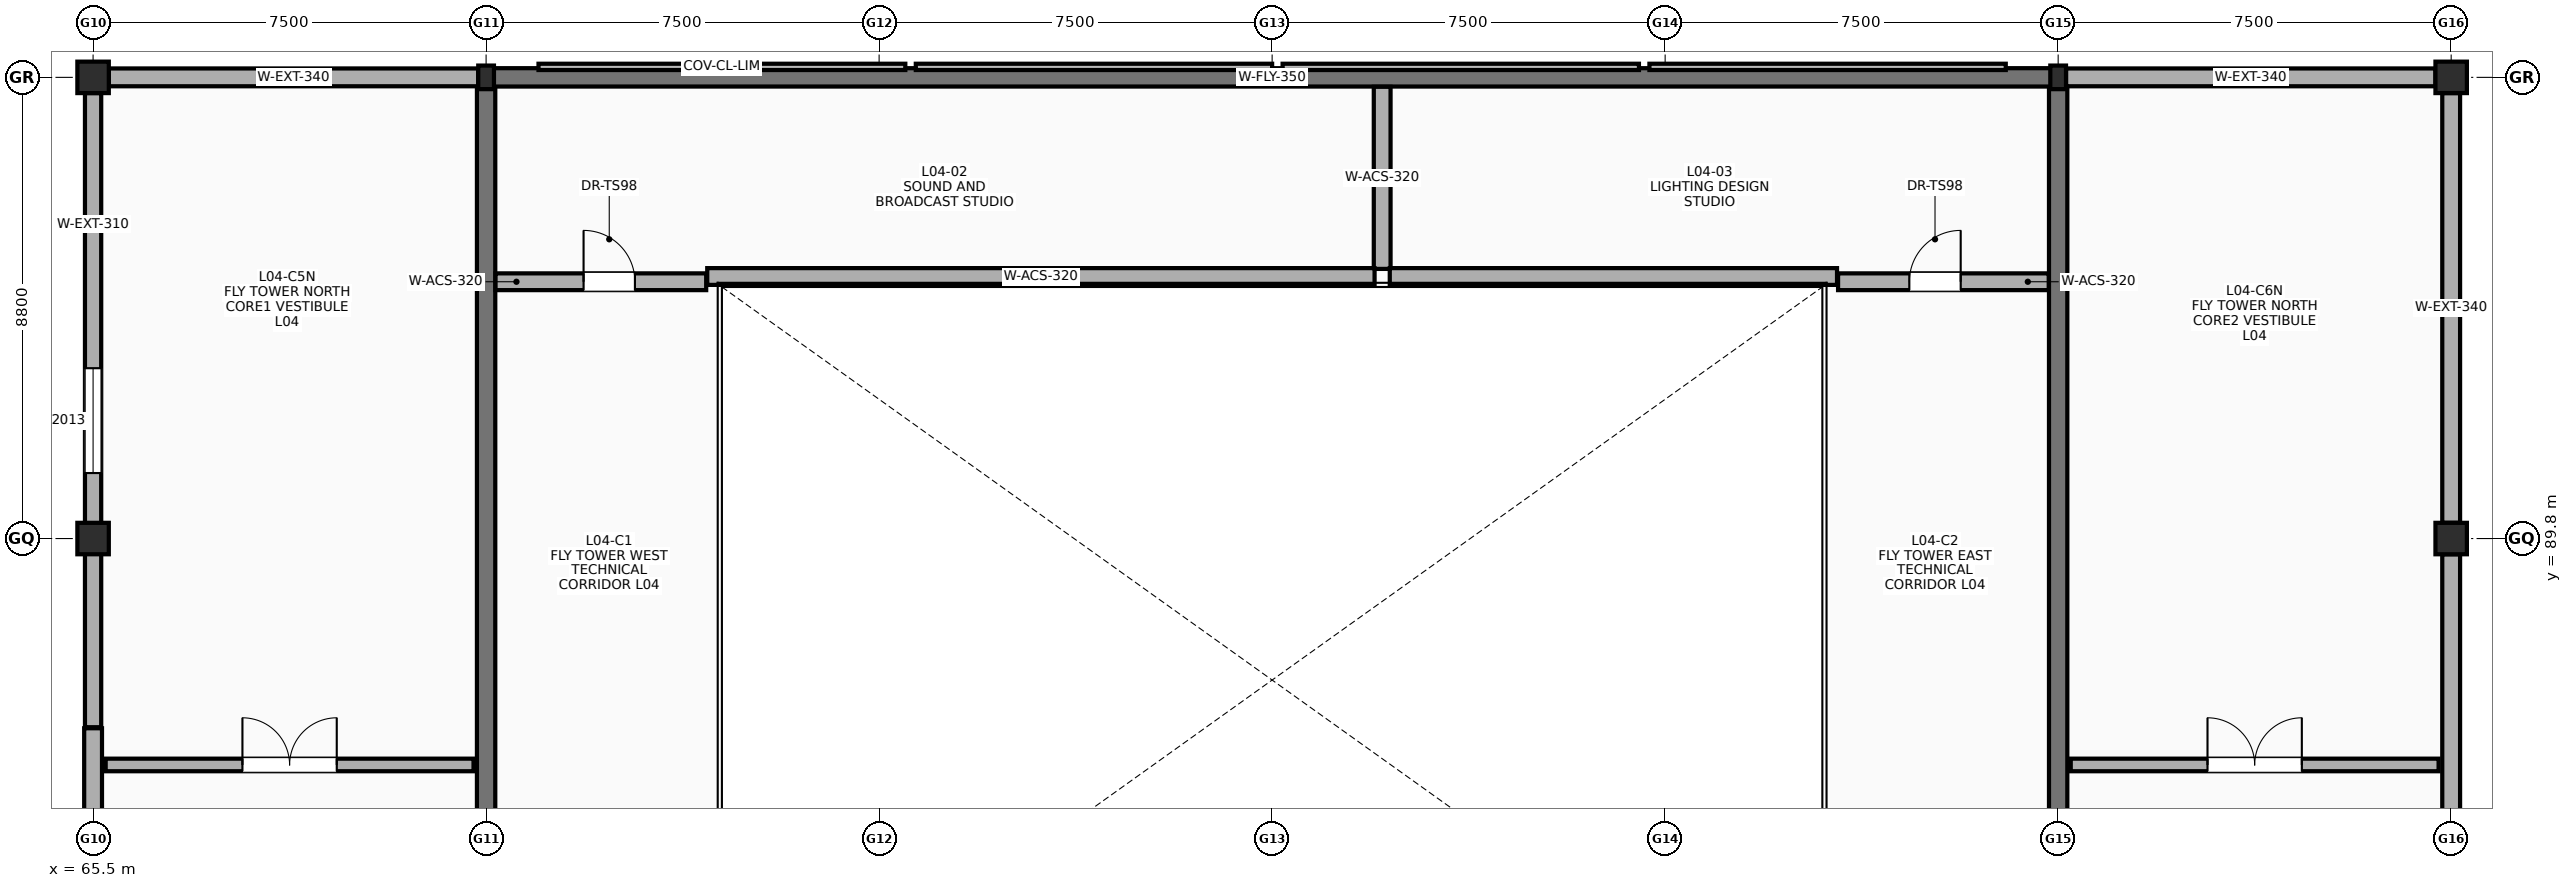
"""IFC4 building model, lengths in metres.
Left out: names, types, materials, properties, quantities, classifications, styles, units other than length and angle.
Written with IfcOpenShell. Run it as: python <this file> out.ifc"""

import sys

from ifc_helpers import new_model, si_unit, direction, frame, frame_2d, origin, origin_2d, place, context, subcontext, project, spatial, rectangle, i_section, extrude, element, fill, save


model = new_model("IFC4")
c1 = context("Model", 3, precision=1e-05, world=origin(), true_north=direction((0.0, 1.0)))
c2 = subcontext(c1, "Body", "Model", "MODEL_VIEW")
j1 = project(units=[si_unit("LENGTHUNIT", "METRE"), si_unit("PLANEANGLEUNIT", "RADIAN")], contexts=[c1])
p1 = place(None, origin())
s1 = spatial("IfcSite", under=j1, at=p1, CompositionType="ELEMENT")
p2 = place(p1, origin())
s2 = spatial("IfcBuilding", under=s1, at=p2, CompositionType="ELEMENT")
p3 = place(p2, frame((0.0, 0.0, 18.0)))
s3 = spatial("IfcBuildingStorey", under=s2, at=p3, CompositionType="ELEMENT", Elevation=18.0)
for number, where, z_axis, x_axis in (
    (1, (65.5, 89.8, 0.0), (0.0, 0.0, 1.0), (1.0, 0.0, 0.0)),
    (2, (65.5, 98.6, 0.0), (0.0, 0.0, 1.0), (1.0, 0.0, 0.0)),
):
    element("IfcColumn", number, at=place(p3, frame(where, z_axis=z_axis, x_axis=x_axis)), inside=s3, PredefinedType="COLUMN", context=c2, shape_type="SweptSolid", body=[
        extrude(rectangle(XDim=0.6, YDim=0.6, at=origin_2d()), origin(), (0.0, 0.0, 1.0), 5.4),
    ])
for number, where, z_axis, x_axis in (
    (3, (73.0, 98.6, 0.0), (0.0, 0.0, 1.0), (1.0, 0.0, 0.0)),
    (4, (103.0, 98.6, 0.0), (0.0, 0.0, 1.0), (1.0, 0.0, 0.0)),
):
    element("IfcColumn", number, at=place(p3, frame(where, z_axis=z_axis, x_axis=x_axis)), inside=s3, PredefinedType="COLUMN", context=c2, shape_type="SweptSolid", body=[
        extrude(i_section(OverallWidth=0.3, OverallDepth=0.45, WebThickness=0.014, FlangeThickness=0.026, FilletRadius=0.027, at=origin_2d()), origin(), (0.0, 0.0, 1.0), 5.4),
    ])
for number, where, z_axis, x_axis in (
    (5, (110.5, 89.8, 0.0), (0.0, 0.0, 1.0), (1.0, 0.0, 0.0)),
    (6, (110.5, 98.6, 0.0), (0.0, 0.0, 1.0), (1.0, 0.0, 0.0)),
):
    element("IfcColumn", number, at=place(p3, frame(where, z_axis=z_axis, x_axis=x_axis)), inside=s3, PredefinedType="COLUMN", context=c2, shape_type="SweptSolid", body=[
        extrude(rectangle(XDim=0.6, YDim=0.6, at=origin_2d()), origin(), (0.0, 0.0, 1.0), 5.4),
    ])
p4 = place(p3, frame((73.0, 72.815, 0.0), z_axis=(0.0, 0.0, 1.0), x_axis=(0.0, 1.0, 0.0)))
e7 = element("IfcWall", 7, at=p4, inside=s3, PredefinedType="SHEAR", context=c2, shape_type="SweptSolid", body=[
    extrude(rectangle(XDim=25.57, YDim=0.35, at=frame_2d((12.785, 0.0))), origin(), (0.0, 0.0, 1.0), 5.4),
])
p5 = place(p4, frame((11.285, 0.0, 0.0), z_axis=(0.0, 0.0, 1.0), x_axis=(-1.0, 0.0, 0.0)))
e8 = element("IfcOpeningElement", 8, at=p5, cuts=e7, PredefinedType="OPENING", context=c2, shape_type="SweptSolid", body=[
    extrude(rectangle(XDim=1.2, YDim=2.15, at=frame_2d((0.6, 1.075))), frame((0.0, 0.185, 0.0), z_axis=(0.0, -1.0, 0.0), x_axis=(1.0, 0.0, 0.0)), (0.0, 0.0, 1.0), 0.37),
])
p6 = place(p3, frame((103.0, 72.815, 0.0), z_axis=(0.0, 0.0, 1.0), x_axis=(0.0, 1.0, 0.0)))
e9 = element("IfcWall", 9, at=p6, inside=s3, PredefinedType="SHEAR", context=c2, shape_type="SweptSolid", body=[
    extrude(rectangle(XDim=25.57, YDim=0.35, at=frame_2d((12.785, 0.0))), origin(), (0.0, 0.0, 1.0), 5.4),
])
p7 = place(p6, frame((10.085, 0.0, 0.0)))
e10 = element("IfcOpeningElement", 10, at=p7, cuts=e9, PredefinedType="OPENING", context=c2, shape_type="SweptSolid", body=[
    extrude(rectangle(XDim=1.2, YDim=2.15, at=frame_2d((0.6, 1.075))), frame((0.0, 0.185, 0.0), z_axis=(0.0, -1.0, 0.0), x_axis=(1.0, 0.0, 0.0)), (0.0, 0.0, 1.0), 0.37),
])
p8 = place(p3, frame((73.005, 98.6, 0.0), z_axis=(0.0, 0.0, 1.0), x_axis=(1.0, 0.0, 0.0)))
e11 = element("IfcWall", 11, at=p8, inside=s3, PredefinedType="SHEAR", context=c2, shape_type="SweptSolid", body=[
    extrude(rectangle(XDim=29.99, YDim=0.35, at=frame_2d((14.995, 0.0))), origin(), (0.0, 0.0, 1.0), 5.4),
])
p9 = place(p3, frame((65.5, 86.2, 0.0), z_axis=(0.0, 0.0, 1.0), x_axis=(0.0, 1.0, 0.0)))
e12 = element("IfcWall", 12, at=p9, inside=s3, PredefinedType="SOLIDWALL", context=c2, shape_type="SweptSolid", body=[
    extrude(rectangle(XDim=12.1, YDim=0.31, at=frame_2d((6.05, 0.0))), origin(), (0.0, 0.0, 1.0), 3.85),
])
p10 = place(p9, frame((4.85, 0.0, 1.25)))
e13 = element("IfcOpeningElement", 13, at=p10, cuts=e12, PredefinedType="OPENING", context=c2, shape_type="SweptSolid", body=[
    extrude(rectangle(XDim=2.0, YDim=1.3, at=frame_2d((1.0, 0.65))), frame((0.0, 0.165, 0.0), z_axis=(0.0, -1.0, 0.0), x_axis=(1.0, 0.0, 0.0)), (0.0, 0.0, 1.0), 0.33),
])
p11 = place(p3, frame((110.5, 81.5, 0.0), z_axis=(0.0, 0.0, 1.0), x_axis=(0.0, 1.0, 0.0)))
e14 = element("IfcWall", 14, at=p11, inside=s3, PredefinedType="SOLIDWALL", context=c2, shape_type="SweptSolid", body=[
    extrude(rectangle(XDim=8.0, YDim=0.34, at=frame_2d((4.0, 0.0))), origin(), (0.0, 0.0, 1.0), 3.85),
])
p12 = place(p3, frame((110.5, 90.1, 0.0), z_axis=(0.0, 0.0, 1.0), x_axis=(0.0, 1.0, 0.0)))
e15 = element("IfcWall", 15, at=p12, inside=s3, PredefinedType="SOLIDWALL", context=c2, shape_type="SweptSolid", body=[
    extrude(rectangle(XDim=8.2, YDim=0.34, at=frame_2d((4.1, 0.0))), origin(), (0.0, 0.0, 1.0), 3.85),
])
for number, where, z_axis, x_axis in (
    (16, (65.8, 98.6, 0.0), (0.0, 0.0, 1.0), (1.0, 0.0, 0.0)),
    (17, (103.15, 98.6, 0.0), (0.0, 0.0, 1.0), (1.0, 0.0, 0.0)),
):
    element("IfcWall", number, at=place(p3, frame(where, z_axis=z_axis, x_axis=x_axis)), inside=s3, PredefinedType="SOLIDWALL", context=c2, shape_type="SweptSolid", body=[
        extrude(rectangle(XDim=7.05, YDim=0.34, at=frame_2d((3.525, 0.0))), origin(), (0.0, 0.0, 1.0), 3.85),
    ])
p13 = place(p3, frame((65.74, 85.48, 0.0), z_axis=(0.0, 0.0, 1.0), x_axis=(1.0, 0.0, 0.0)))
e18 = element("IfcWall", 18, at=p13, inside=s3, PredefinedType="SOLIDWALL", context=c2, shape_type="SweptSolid", body=[
    extrude(rectangle(XDim=7.02, YDim=0.24, at=frame_2d((3.51, 0.0))), origin(), (0.0, 0.0, 1.0), 4.3),
])
p14 = place(p13, frame((2.61, 0.0, 0.0)))
e19 = element("IfcOpeningElement", 19, at=p14, cuts=e18, PredefinedType="OPENING", context=c2, shape_type="SweptSolid", body=[
    extrude(rectangle(XDim=1.8, YDim=2.18, at=frame_2d((0.9, 1.09))), frame((0.0, 0.13, 0.0), z_axis=(0.0, -1.0, 0.0), x_axis=(1.0, 0.0, 0.0)), (0.0, 0.0, 1.0), 0.26),
])
p15 = place(p3, frame((103.24, 85.48, 0.0), z_axis=(0.0, 0.0, 1.0), x_axis=(1.0, 0.0, 0.0)))
e20 = element("IfcWall", 20, at=p15, inside=s3, PredefinedType="SOLIDWALL", context=c2, shape_type="SweptSolid", body=[
    extrude(rectangle(XDim=7.02, YDim=0.24, at=frame_2d((3.51, 0.0))), origin(), (0.0, 0.0, 1.0), 4.3),
])
p16 = place(p15, frame((2.61, 0.0, 0.0)))
e21 = element("IfcOpeningElement", 21, at=p16, cuts=e20, PredefinedType="OPENING", context=c2, shape_type="SweptSolid", body=[
    extrude(rectangle(XDim=1.8, YDim=2.18, at=frame_2d((0.9, 1.09))), frame((0.0, 0.13, 0.0), z_axis=(0.0, -1.0, 0.0), x_axis=(1.0, 0.0, 0.0)), (0.0, 0.0, 1.0), 0.26),
])
p17 = place(p3, frame((90.1, 94.945, 0.0), z_axis=(0.0, 0.0, 1.0), x_axis=(0.0, 1.0, 0.0)))
e22 = element("IfcWall", 22, at=p17, inside=s3, PredefinedType="PARTITIONING", context=c2, shape_type="SweptSolid", body=[
    extrude(rectangle(XDim=3.475, YDim=0.32, at=frame_2d((1.737, 0.0))), origin(), (0.0, 0.0, 1.0), 5.1),
])
p18 = place(p3, frame((73.18, 94.7, 0.0), z_axis=(0.0, 0.0, 1.0), x_axis=(1.0, 0.0, 0.0)))
e23 = element("IfcWall", 23, at=p18, inside=s3, PredefinedType="PARTITIONING", context=c2, shape_type="SweptSolid", body=[
    extrude(rectangle(XDim=4.02, YDim=0.32, at=frame_2d((2.01, 0.0))), origin(), (0.0, 0.0, 1.0), 5.1),
])
p19 = place(p18, frame((1.68, 0.0, 0.0)))
e24 = element("IfcOpeningElement", 24, at=p19, cuts=e23, PredefinedType="OPENING", context=c2, shape_type="SweptSolid", body=[
    extrude(rectangle(XDim=0.98, YDim=2.15, at=frame_2d((0.49, 1.075))), frame((0.0, 0.17, 0.0), z_axis=(0.0, -1.0, 0.0), x_axis=(1.0, 0.0, 0.0)), (0.0, 0.0, 1.0), 0.34),
])
p20 = place(p3, frame((98.8, 94.7, 0.0), z_axis=(0.0, 0.0, 1.0), x_axis=(1.0, 0.0, 0.0)))
e25 = element("IfcWall", 25, at=p20, inside=s3, PredefinedType="PARTITIONING", context=c2, shape_type="SweptSolid", body=[
    extrude(rectangle(XDim=4.02, YDim=0.32, at=frame_2d((2.01, 0.0))), origin(), (0.0, 0.0, 1.0), 5.1),
])
p21 = place(p20, frame((1.36, 0.0, 0.0)))
e26 = element("IfcOpeningElement", 26, at=p21, cuts=e25, PredefinedType="OPENING", context=c2, shape_type="SweptSolid", body=[
    extrude(rectangle(XDim=0.98, YDim=2.15, at=frame_2d((0.49, 1.075))), frame((0.0, 0.17, 0.0), z_axis=(0.0, -1.0, 0.0), x_axis=(1.0, 0.0, 0.0)), (0.0, 0.0, 1.0), 0.34),
])
p22 = place(p3, frame((65.5, 81.5, 0.0), z_axis=(0.0, 0.0, 1.0), x_axis=(0.0, 1.0, 0.0)))
e27 = element("IfcWall", 27, at=p22, inside=s3, PredefinedType="SOLIDWALL", context=c2, shape_type="SweptSolid", body=[
    extrude(rectangle(XDim=4.68, YDim=0.34, at=frame_2d((2.34, 0.0))), origin(), (0.0, 0.0, 1.0), 3.85),
])
p23 = place(p3, frame((77.22, 94.8, 0.0), z_axis=(0.0, 0.0, 1.0), x_axis=(1.0, 0.0, 0.0)))
e28 = element("IfcWall", 28, at=p23, inside=s3, PredefinedType="PARTITIONING", context=c2, shape_type="SweptSolid", body=[
    extrude(rectangle(XDim=12.735, YDim=0.32, at=frame_2d((6.368, 0.0))), origin(), (0.0, 0.0, 1.0), 5.1),
])
p24 = place(p3, frame((90.245, 94.8, 0.0), z_axis=(0.0, 0.0, 1.0), x_axis=(1.0, 0.0, 0.0)))
e29 = element("IfcWall", 29, at=p24, inside=s3, PredefinedType="PARTITIONING", context=c2, shape_type="SweptSolid", body=[
    extrude(rectangle(XDim=8.535, YDim=0.32, at=frame_2d((4.268, 0.0))), origin(), (0.0, 0.0, 1.0), 5.1),
])
p25 = place(p10, origin())
e30 = element("IfcWindow", 30, at=p25, inside=s3, PartitioningType="SINGLE_PANEL", PredefinedType="WINDOW", context=c2, shape_type="SweptSolid", body=[
    extrude(rectangle(XDim=2.0, YDim=1.3, at=frame_2d((1.0, 0.65))), frame((0.0, 0.03, 0.0), z_axis=(0.0, -1.0, 0.0), x_axis=(1.0, 0.0, 0.0)), (0.0, 0.0, 1.0), 0.06),
])
fill(e13, e30)
p26 = place(p14, origin())
e31 = element("IfcDoor", 31, at=p26, inside=s3, OperationType="DOUBLE_DOOR_SINGLE_SWING", PredefinedType="DOOR", context=c2, shape_type="SweptSolid", body=[
    extrude(rectangle(XDim=1.8, YDim=2.18, at=frame_2d((0.9, 1.09))), frame((0.0, 0.025, 0.0), z_axis=(0.0, -1.0, 0.0), x_axis=(1.0, 0.0, 0.0)), (0.0, 0.0, 1.0), 0.05),
])
fill(e19, e31)
p27 = place(p16, origin())
e32 = element("IfcDoor", 32, at=p27, inside=s3, OperationType="DOUBLE_DOOR_SINGLE_SWING", PredefinedType="DOOR", context=c2, shape_type="SweptSolid", body=[
    extrude(rectangle(XDim=1.8, YDim=2.18, at=frame_2d((0.9, 1.09))), frame((0.0, 0.025, 0.0), z_axis=(0.0, -1.0, 0.0), x_axis=(1.0, 0.0, 0.0)), (0.0, 0.0, 1.0), 0.05),
])
fill(e21, e32)
p28 = place(p19, origin())
e33 = element("IfcDoor", 33, at=p28, inside=s3, OperationType="SINGLE_SWING_LEFT", PredefinedType="DOOR", context=c2, shape_type="SweptSolid", body=[
    extrude(rectangle(XDim=0.98, YDim=2.15, at=frame_2d((0.49, 1.075))), frame((0.0, 0.025, 0.0), z_axis=(0.0, -1.0, 0.0), x_axis=(1.0, 0.0, 0.0)), (0.0, 0.0, 1.0), 0.05),
])
fill(e24, e33)
p29 = place(p21, origin())
e34 = element("IfcDoor", 34, at=p29, inside=s3, OperationType="SINGLE_SWING_RIGHT", PredefinedType="DOOR", context=c2, shape_type="SweptSolid", body=[
    extrude(rectangle(XDim=0.98, YDim=2.15, at=frame_2d((0.49, 1.075))), frame((0.0, 0.025, 0.0), z_axis=(0.0, -1.0, 0.0), x_axis=(1.0, 0.0, 0.0)), (0.0, 0.0, 1.0), 0.05),
])
fill(e26, e34)
save(model, sys.argv[1])
